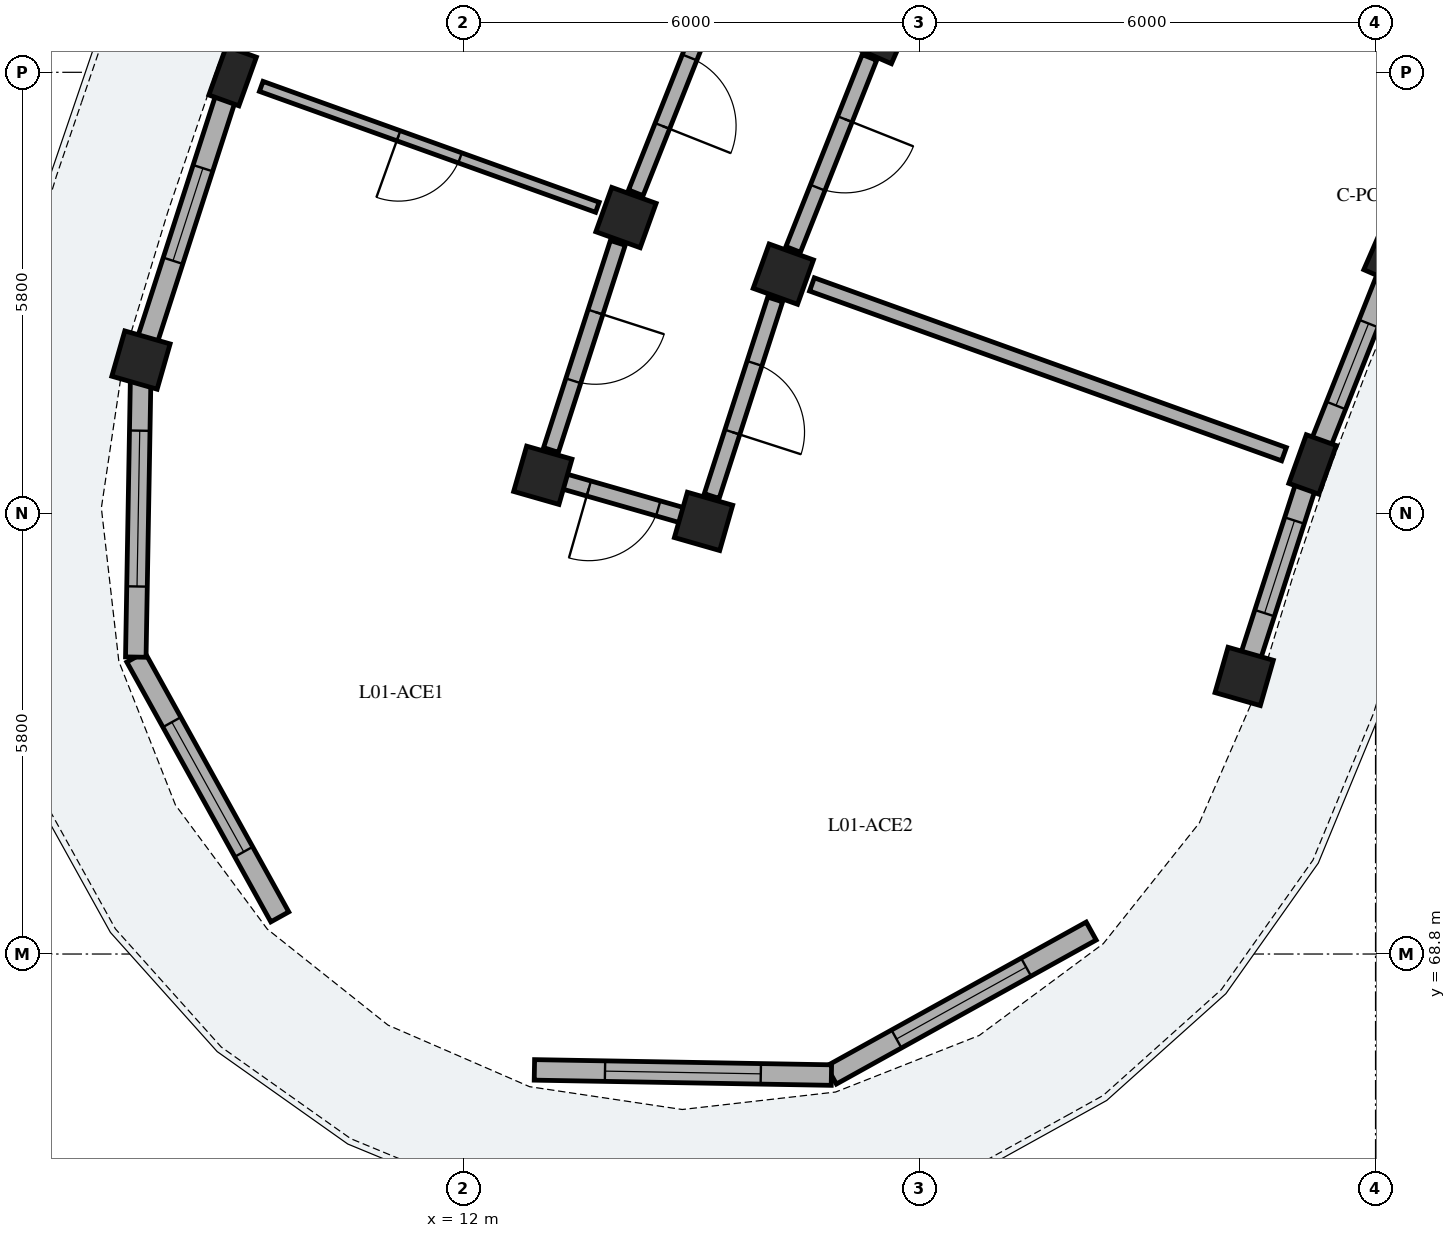
"""IFC4 building model, lengths in metres.
Left out: names, types, materials, properties, quantities, classifications, styles, units other than length and angle.
Written with IfcOpenShell. Run it as: python <this file> out.ifc"""

import sys

from ifc_helpers import new_model, si_unit, direction, frame, frame_2d, origin, origin_2d, place, context, subcontext, project, spatial, rectangle, extrude, element, fill, save


model = new_model("IFC4")
c1 = context("Model", 3, precision=1e-05, world=origin(), true_north=direction((0.0, 1.0)))
c2 = subcontext(c1, "Body", "Model", "MODEL_VIEW")
j1 = project(units=[si_unit("LENGTHUNIT", "METRE"), si_unit("PLANEANGLEUNIT", "RADIAN")], contexts=[c1])
p1 = place(None, origin())
s1 = spatial("IfcSite", under=j1, at=p1, CompositionType="ELEMENT")
p2 = place(p1, origin())
s2 = spatial("IfcBuilding", under=s1, at=p2, CompositionType="ELEMENT")
p3 = place(p2, frame((0.0, 0.0, 4.76)))
s3 = spatial("IfcBuildingStorey", under=s2, at=p3, CompositionType="ELEMENT", Elevation=4.76)
for number, where, z_axis, x_axis in (
    (1, (24.254, 77.964, 0.0), (0.0, 0.0, 1.0), (-0.917, 0.4, 0.0)),
    (2, (17.47, 80.921, 0.0), (0.0, 0.0, 1.0), (-0.917, 0.4, 0.0)),
):
    element("IfcColumn", number, at=place(p3, frame(where, z_axis=z_axis, x_axis=x_axis)), inside=s3, PredefinedType="COLUMN", context=c2, shape_type="SweptSolid", body=[
        extrude(rectangle(XDim=0.62, YDim=0.62, at=origin_2d()), origin(), (0.0, 0.0, 1.0), 3.825),
    ])
p4 = place(p3, frame((23.172, 75.241, 0.0), z_axis=(0.0, 0.0, 1.0), x_axis=(-0.941012100316, 0.338372911236, 0.0)))
e3 = element("IfcColumn", 3, at=p4, inside=s3, PredefinedType="PILASTER", context=c2, shape_type="SweptSolid", body=[
    extrude(rectangle(XDim=0.42, YDim=0.68, at=origin_2d()), origin(), (0.0, 0.0, 1.0), 3.825),
])
for number, where, z_axis, x_axis in (
    (4, (16.208, 77.745, 0.0), (0.0, 0.0, 1.0), (-0.941, 0.338, 0.0)),
    (5, (14.138, 78.489, 0.0), (0.0, 0.0, 1.0), (-0.941, 0.338, 0.0)),
):
    element("IfcColumn", number, at=place(p3, frame(where, z_axis=z_axis, x_axis=x_axis)), inside=s3, PredefinedType="COLUMN", context=c2, shape_type="SweptSolid", body=[
        extrude(rectangle(XDim=0.62, YDim=0.62, at=origin_2d()), origin(), (0.0, 0.0, 1.0), 3.825),
    ])
p5 = place(p3, frame((8.963, 80.35, 0.0), z_axis=(0.0, 0.0, 1.0), x_axis=(-0.941012100316, 0.338372911236, 0.0)))
e6 = element("IfcColumn", 6, at=p5, inside=s3, PredefinedType="PILASTER", context=c2, shape_type="SweptSolid", body=[
    extrude(rectangle(XDim=0.42, YDim=0.68, at=origin_2d()), origin(), (0.0, 0.0, 1.0), 3.825),
])
for number, where, z_axis, x_axis in (
    (7, (22.272, 72.452, 0.0), (0.0, 0.0, 1.0), (-0.961, 0.276, 0.0)),
    (8, (15.159, 74.492, 0.0), (0.0, 0.0, 1.0), (-0.961, 0.276, 0.0)),
    (9, (13.044, 75.098, 0.0), (0.0, 0.0, 1.0), (-0.961, 0.276, 0.0)),
    (10, (7.757, 76.614, 0.0), (0.0, 0.0, 1.0), (-0.961, 0.276, 0.0)),
):
    element("IfcColumn", number, at=place(p3, frame(where, z_axis=z_axis, x_axis=x_axis)), inside=s3, PredefinedType="COLUMN", context=c2, shape_type="SweptSolid", body=[
        extrude(rectangle(XDim=0.62, YDim=0.62, at=origin_2d()), origin(), (0.0, 0.0, 1.0), 3.825),
    ])
p6 = place(p3, frame((24.15, 77.704, 0.0), z_axis=(0.0, 0.0, 1.0), x_axis=(-0.369157243617, -0.929366950932, 0.0)))
e11 = element("IfcWall", 11, at=p6, inside=s3, PredefinedType="SOLIDWALL", context=c2, shape_type="SweptSolid", body=[
    extrude(rectangle(XDim=2.47, YDim=0.27, at=frame_2d((1.235, 0.0))), origin(), (0.0, 0.0, 1.0), 3.075),
])
p7 = place(p6, frame((0.655, 0.0, 0.55)))
e12 = element("IfcOpeningElement", 12, at=p7, cuts=e11, PredefinedType="OPENING", context=c2, shape_type="SweptSolid", body=[
    extrude(rectangle(XDim=1.16, YDim=1.485, at=frame_2d((0.58, 0.743))), frame((0.0, 0.145, 0.0), z_axis=(0.0, -1.0, 0.0), x_axis=(1.0, 0.0, 0.0)), (0.0, 0.0, 1.0), 0.29),
])
p8 = place(p3, frame((8.907, 80.179, 0.0), z_axis=(0.0, 0.0, 1.0), x_axis=(-0.30721065507, -0.951641536195, 0.0)))
e13 = element("IfcWall", 13, at=p8, inside=s3, PredefinedType="SOLIDWALL", context=c2, shape_type="SweptSolid", body=[
    extrude(rectangle(XDim=3.466, YDim=0.27, at=frame_2d((1.733, 0.0))), origin(), (0.0, 0.0, 1.0), 3.075),
])
p9 = place(p8, frame((1.093, 0.0, 0.55)))
e14 = element("IfcOpeningElement", 14, at=p9, cuts=e13, PredefinedType="OPENING", context=c2, shape_type="SweptSolid", body=[
    extrude(rectangle(XDim=1.28, YDim=1.52, at=frame_2d((0.64, 0.76))), frame((0.0, 0.145, 0.0), z_axis=(0.0, -1.0, 0.0), x_axis=(1.0, 0.0, 0.0)), (0.0, 0.0, 1.0), 0.29),
])
p10 = place(p3, frame((23.117, 75.069, 0.0), z_axis=(0.0, 0.0, 1.0), x_axis=(-0.307170258834, -0.951654576035, 0.0)))
e15 = element("IfcWall", 15, at=p10, inside=s3, PredefinedType="SOLIDWALL", context=c2, shape_type="SweptSolid", body=[
    extrude(rectangle(XDim=2.47, YDim=0.27, at=frame_2d((1.235, 0.0))), origin(), (0.0, 0.0, 1.0), 3.075),
])
p11 = place(p10, frame((0.595, 0.0, 0.55)))
e16 = element("IfcOpeningElement", 16, at=p11, cuts=e15, PredefinedType="OPENING", context=c2, shape_type="SweptSolid", body=[
    extrude(rectangle(XDim=1.28, YDim=1.56, at=frame_2d((0.64, 0.78))), frame((0.0, 0.145, 0.0), z_axis=(0.0, -1.0, 0.0), x_axis=(1.0, 0.0, 0.0)), (0.0, 0.0, 1.0), 0.29),
])
p12 = place(p3, frame((20.259, 69.102, 0.0), z_axis=(0.0, 0.0, 1.0), x_axis=(-0.874643043537, -0.484767517881, 0.0)))
e17 = element("IfcWall", 17, at=p12, inside=s3, PredefinedType="SOLIDWALL", context=c2, shape_type="SweptSolid", body=[
    extrude(rectangle(XDim=3.908, YDim=0.27, at=frame_2d((1.954, 0.0))), origin(), (0.0, 0.0, 1.0), 3.075),
])
p13 = place(p12, frame((0.979, 0.0, 0.4)))
e18 = element("IfcOpeningElement", 18, at=p13, cuts=e17, PredefinedType="OPENING", context=c2, shape_type="SweptSolid", body=[
    extrude(rectangle(XDim=1.95, YDim=1.78, at=frame_2d((0.975, 0.89))), frame((0.0, 0.145, 0.0), z_axis=(0.0, -1.0, 0.0), x_axis=(1.0, 0.0, 0.0)), (0.0, 0.0, 1.0), 0.29),
])
p14 = place(p3, frame((16.841, 67.208, 0.0), z_axis=(0.0, 0.0, 1.0), x_axis=(-0.999848096392, 0.017429404492, 0.0)))
e19 = element("IfcWall", 19, at=p14, inside=s3, PredefinedType="SOLIDWALL", context=c2, shape_type="SweptSolid", body=[
    extrude(rectangle(XDim=3.908, YDim=0.27, at=frame_2d((1.954, 0.0))), origin(), (0.0, 0.0, 1.0), 3.075),
])
p15 = place(p14, frame((0.929, 0.0, 0.4)))
e20 = element("IfcOpeningElement", 20, at=p15, cuts=e19, PredefinedType="OPENING", context=c2, shape_type="SweptSolid", body=[
    extrude(rectangle(XDim=2.05, YDim=1.82, at=frame_2d((1.025, 0.91))), frame((0.0, 0.145, 0.0), z_axis=(0.0, -1.0, 0.0), x_axis=(1.0, 0.0, 0.0)), (0.0, 0.0, 1.0), 0.29),
])
p16 = place(p3, frame((9.583, 69.289, 0.0), z_axis=(0.0, 0.0, 1.0), x_axis=(-0.484841794757, 0.874601871743, 0.0)))
e21 = element("IfcWall", 21, at=p16, inside=s3, PredefinedType="SOLIDWALL", context=c2, shape_type="SweptSolid", body=[
    extrude(rectangle(XDim=3.908, YDim=0.27, at=frame_2d((1.954, 0.0))), origin(), (0.0, 0.0, 1.0), 3.075),
])
p17 = place(p16, frame((0.979, 0.0, 0.4)))
e22 = element("IfcOpeningElement", 22, at=p17, cuts=e21, PredefinedType="OPENING", context=c2, shape_type="SweptSolid", body=[
    extrude(rectangle(XDim=1.95, YDim=1.78, at=frame_2d((0.975, 0.89))), frame((0.0, 0.145, 0.0), z_axis=(0.0, -1.0, 0.0), x_axis=(1.0, 0.0, 0.0)), (0.0, 0.0, 1.0), 0.29),
])
p18 = place(p3, frame((7.689, 72.707, 0.0), z_axis=(0.0, 0.0, 1.0), x_axis=(0.017428315893, 0.999848115368, 0.0)))
e23 = element("IfcWall", 23, at=p18, inside=s3, PredefinedType="SOLIDWALL", context=c2, shape_type="SweptSolid", body=[
    extrude(rectangle(XDim=3.908, YDim=0.27, at=frame_2d((1.954, 0.0))), origin(), (0.0, 0.0, 1.0), 3.075),
])
p19 = place(p18, frame((0.929, 0.0, 0.4)))
e24 = element("IfcOpeningElement", 24, at=p19, cuts=e23, PredefinedType="OPENING", context=c2, shape_type="SweptSolid", body=[
    extrude(rectangle(XDim=2.05, YDim=1.82, at=frame_2d((1.025, 0.91))), frame((0.0, 0.145, 0.0), z_axis=(0.0, -1.0, 0.0), x_axis=(1.0, 0.0, 0.0)), (0.0, 0.0, 1.0), 0.29),
])
p20 = place(p3, frame((15.325, 81.475, 0.0), z_axis=(0.0, 0.0, 1.0), x_axis=(-0.369213832442, -0.929344471083, 0.0)))
e25 = element("IfcWall", 25, at=p20, inside=s3, PredefinedType="PARTITIONING", context=c2, shape_type="SweptSolid", body=[
    extrude(rectangle(XDim=2.863, YDim=0.205, at=frame_2d((1.432, 0.0))), origin(), (0.0, 0.0, 1.0), 3.09),
])
p21 = place(p20, frame((0.947, 0.0, 0.0)))
e26 = element("IfcOpeningElement", 26, at=p21, cuts=e25, PredefinedType="OPENING", context=c2, shape_type="SweptSolid", body=[
    extrude(rectangle(XDim=0.97, YDim=2.15, at=frame_2d((0.485, 1.075))), frame((0.0, 0.113, 0.0), z_axis=(0.0, -1.0, 0.0), x_axis=(1.0, 0.0, 0.0)), (0.0, 0.0, 1.0), 0.225),
])
p22 = place(p3, frame((17.341, 80.596, 0.0), z_axis=(0.0, 0.0, 1.0), x_axis=(-0.369237170461, -0.929335198919, 0.0)))
e27 = element("IfcWall", 27, at=p22, inside=s3, PredefinedType="PARTITIONING", context=c2, shape_type="SweptSolid", body=[
    extrude(rectangle(XDim=2.718, YDim=0.205, at=frame_2d((1.359, 0.0))), origin(), (0.0, 0.0, 1.0), 3.09),
])
p23 = place(p22, frame((0.874, 0.0, 0.0)))
e28 = element("IfcOpeningElement", 28, at=p23, cuts=e27, PredefinedType="OPENING", context=c2, shape_type="SweptSolid", body=[
    extrude(rectangle(XDim=0.97, YDim=2.15, at=frame_2d((0.485, 1.075))), frame((0.0, 0.113, 0.0), z_axis=(0.0, -1.0, 0.0), x_axis=(1.0, 0.0, 0.0)), (0.0, 0.0, 1.0), 0.225),
])
p24 = place(p3, frame((13.762, 78.625, 0.0), z_axis=(0.0, 0.0, 1.0), x_axis=(-0.941015806044, 0.338362605463, 0.0)))
e29 = element("IfcWall", 29, at=p24, inside=s3, PredefinedType="PLUMBINGWALL", context=c2, shape_type="SweptSolid", body=[
    extrude(rectangle(XDim=4.7, YDim=0.14, at=frame_2d((2.35, 0.0))), origin(), (0.0, 0.0, 1.0), 3.09),
])
p25 = place(p24, frame((1.92, 0.0, 0.0)))
e30 = element("IfcOpeningElement", 30, at=p25, cuts=e29, PredefinedType="OPENING", context=c2, shape_type="SweptSolid", body=[
    extrude(rectangle(XDim=0.86, YDim=2.06, at=frame_2d((0.43, 1.03))), frame((0.0, 0.08, 0.0), z_axis=(0.0, -1.0, 0.0), x_axis=(1.0, 0.0, 0.0)), (0.0, 0.0, 1.0), 0.16),
])
p26 = place(p3, frame((22.796, 75.376, 0.0), z_axis=(0.0, 0.0, 1.0), x_axis=(-0.941005714099, 0.338390670725, 0.0)))
e31 = element("IfcWall", 31, at=p26, inside=s3, PredefinedType="PARTITIONING", context=c2, shape_type="SweptSolid", body=[
    extrude(rectangle(XDim=6.6, YDim=0.185, at=frame_2d((3.3, 0.0))), origin(), (0.0, 0.0, 1.0), 3.09),
])
p27 = place(p3, frame((14.031, 78.156, 0.0), z_axis=(0.0, 0.0, 1.0), x_axis=(-0.307132325305, -0.951666819193, 0.0)))
e32 = element("IfcWall", 32, at=p27, inside=s3, PredefinedType="PARTITIONING", context=c2, shape_type="SweptSolid", body=[
    extrude(rectangle(XDim=2.863, YDim=0.205, at=frame_2d((1.432, 0.0))), origin(), (0.0, 0.0, 1.0), 3.09),
])
p28 = place(p27, frame((0.957, 0.0, 0.0)))
e33 = element("IfcOpeningElement", 33, at=p28, cuts=e32, PredefinedType="OPENING", context=c2, shape_type="SweptSolid", body=[
    extrude(rectangle(XDim=0.95, YDim=2.13, at=frame_2d((0.475, 1.065))), frame((0.0, 0.113, 0.0), z_axis=(0.0, -1.0, 0.0), x_axis=(1.0, 0.0, 0.0)), (0.0, 0.0, 1.0), 0.225),
])
p29 = place(p3, frame((16.101, 77.412, 0.0), z_axis=(0.0, 0.0, 1.0), x_axis=(-0.307186478934, -0.95164934044, 0.0)))
e34 = element("IfcWall", 34, at=p29, inside=s3, PredefinedType="PARTITIONING", context=c2, shape_type="SweptSolid", body=[
    extrude(rectangle(XDim=2.718, YDim=0.205, at=frame_2d((1.359, 0.0))), origin(), (0.0, 0.0, 1.0), 3.09),
])
p30 = place(p29, frame((0.884, 0.0, 0.0)))
e35 = element("IfcOpeningElement", 35, at=p30, cuts=e34, PredefinedType="OPENING", context=c2, shape_type="SweptSolid", body=[
    extrude(rectangle(XDim=0.95, YDim=2.13, at=frame_2d((0.475, 1.065))), frame((0.0, 0.113, 0.0), z_axis=(0.0, -1.0, 0.0), x_axis=(1.0, 0.0, 0.0)), (0.0, 0.0, 1.0), 0.225),
])
p31 = place(p3, frame((15.111, 74.506, 0.0), z_axis=(0.0, 0.0, 1.0), x_axis=(-0.961264701934, 0.275626872449, 0.0)))
e36 = element("IfcWall", 36, at=p31, inside=s3, PredefinedType="PARTITIONING", context=c2, shape_type="SweptSolid", body=[
    extrude(rectangle(XDim=2.1, YDim=0.205, at=frame_2d((1.05, 0.0))), origin(), (0.0, 0.0, 1.0), 3.09),
])
p32 = place(p31, frame((0.57, 0.0, 0.0)))
e37 = element("IfcOpeningElement", 37, at=p32, cuts=e36, PredefinedType="OPENING", context=c2, shape_type="SweptSolid", body=[
    extrude(rectangle(XDim=0.95, YDim=2.13, at=frame_2d((0.475, 1.065))), frame((0.0, 0.113, 0.0), z_axis=(0.0, -1.0, 0.0), x_axis=(1.0, 0.0, 0.0)), (0.0, 0.0, 1.0), 0.225),
])
p33 = place(p7, origin())
e38 = element("IfcWindow", 38, at=p33, inside=s3, PartitioningType="SINGLE_PANEL", PredefinedType="WINDOW", context=c2, shape_type="SweptSolid", body=[
    extrude(rectangle(XDim=1.16, YDim=1.485, at=frame_2d((0.58, 0.743))), frame((0.0, 0.03, 0.0), z_axis=(0.0, -1.0, 0.0), x_axis=(1.0, 0.0, 0.0)), (0.0, 0.0, 1.0), 0.06),
])
fill(e12, e38)
p34 = place(p9, origin())
e39 = element("IfcWindow", 39, at=p34, inside=s3, PartitioningType="SINGLE_PANEL", PredefinedType="WINDOW", context=c2, shape_type="SweptSolid", body=[
    extrude(rectangle(XDim=1.28, YDim=1.52, at=frame_2d((0.64, 0.76))), frame((0.0, 0.03, 0.0), z_axis=(0.0, -1.0, 0.0), x_axis=(1.0, 0.0, 0.0)), (0.0, 0.0, 1.0), 0.06),
])
fill(e14, e39)
p35 = place(p11, origin())
e40 = element("IfcWindow", 40, at=p35, inside=s3, PartitioningType="SINGLE_PANEL", PredefinedType="WINDOW", context=c2, shape_type="SweptSolid", body=[
    extrude(rectangle(XDim=1.28, YDim=1.56, at=frame_2d((0.64, 0.78))), frame((0.0, 0.03, 0.0), z_axis=(0.0, -1.0, 0.0), x_axis=(1.0, 0.0, 0.0)), (0.0, 0.0, 1.0), 0.06),
])
fill(e16, e40)
p36 = place(p13, origin())
e41 = element("IfcWindow", 41, at=p36, inside=s3, PartitioningType="SINGLE_PANEL", PredefinedType="WINDOW", context=c2, shape_type="SweptSolid", body=[
    extrude(rectangle(XDim=1.95, YDim=1.78, at=frame_2d((0.975, 0.89))), frame((0.0, 0.03, 0.0), z_axis=(0.0, -1.0, 0.0), x_axis=(1.0, 0.0, 0.0)), (0.0, 0.0, 1.0), 0.06),
])
fill(e18, e41)
p37 = place(p15, origin())
e42 = element("IfcWindow", 42, at=p37, inside=s3, PartitioningType="SINGLE_PANEL", PredefinedType="WINDOW", context=c2, shape_type="SweptSolid", body=[
    extrude(rectangle(XDim=2.05, YDim=1.82, at=frame_2d((1.025, 0.91))), frame((0.0, 0.03, 0.0), z_axis=(0.0, -1.0, 0.0), x_axis=(1.0, 0.0, 0.0)), (0.0, 0.0, 1.0), 0.06),
])
fill(e20, e42)
p38 = place(p17, origin())
e43 = element("IfcWindow", 43, at=p38, inside=s3, PartitioningType="SINGLE_PANEL", PredefinedType="WINDOW", context=c2, shape_type="SweptSolid", body=[
    extrude(rectangle(XDim=1.95, YDim=1.78, at=frame_2d((0.975, 0.89))), frame((0.0, 0.03, 0.0), z_axis=(0.0, -1.0, 0.0), x_axis=(1.0, 0.0, 0.0)), (0.0, 0.0, 1.0), 0.06),
])
fill(e22, e43)
p39 = place(p19, origin())
e44 = element("IfcWindow", 44, at=p39, inside=s3, PartitioningType="SINGLE_PANEL", PredefinedType="WINDOW", context=c2, shape_type="SweptSolid", body=[
    extrude(rectangle(XDim=2.05, YDim=1.82, at=frame_2d((1.025, 0.91))), frame((0.0, 0.03, 0.0), z_axis=(0.0, -1.0, 0.0), x_axis=(1.0, 0.0, 0.0)), (0.0, 0.0, 1.0), 0.06),
])
fill(e24, e44)
p40 = place(p21, origin())
e45 = element("IfcDoor", 45, at=p40, inside=s3, OperationType="SINGLE_SWING_RIGHT", PredefinedType="DOOR", context=c2, shape_type="SweptSolid", body=[
    extrude(rectangle(XDim=0.97, YDim=2.15, at=frame_2d((0.485, 1.075))), frame((0.0, 0.025, 0.0), z_axis=(0.0, -1.0, 0.0), x_axis=(1.0, 0.0, 0.0)), (0.0, 0.0, 1.0), 0.05),
])
fill(e26, e45)
p41 = place(p23, origin())
e46 = element("IfcDoor", 46, at=p41, inside=s3, OperationType="SINGLE_SWING_LEFT", PredefinedType="DOOR", context=c2, shape_type="SweptSolid", body=[
    extrude(rectangle(XDim=0.97, YDim=2.15, at=frame_2d((0.485, 1.075))), frame((0.0, 0.025, 0.0), z_axis=(0.0, -1.0, 0.0), x_axis=(1.0, 0.0, 0.0)), (0.0, 0.0, 1.0), 0.05),
])
fill(e28, e46)
p42 = place(p25, origin())
e47 = element("IfcDoor", 47, at=p42, inside=s3, OperationType="SINGLE_SWING_RIGHT", PredefinedType="DOOR", context=c2, shape_type="SweptSolid", body=[
    extrude(rectangle(XDim=0.86, YDim=2.06, at=frame_2d((0.43, 1.03))), frame((0.0, 0.025, 0.0), z_axis=(0.0, -1.0, 0.0), x_axis=(1.0, 0.0, 0.0)), (0.0, 0.0, 1.0), 0.05),
])
fill(e30, e47)
p43 = place(p28, origin())
e48 = element("IfcDoor", 48, at=p43, inside=s3, OperationType="SINGLE_SWING_LEFT", PredefinedType="DOOR", context=c2, shape_type="SweptSolid", body=[
    extrude(rectangle(XDim=0.95, YDim=2.13, at=frame_2d((0.475, 1.065))), frame((0.0, 0.025, 0.0), z_axis=(0.0, -1.0, 0.0), x_axis=(1.0, 0.0, 0.0)), (0.0, 0.0, 1.0), 0.05),
])
fill(e33, e48)
p44 = place(p30, origin())
e49 = element("IfcDoor", 49, at=p44, inside=s3, OperationType="SINGLE_SWING_RIGHT", PredefinedType="DOOR", context=c2, shape_type="SweptSolid", body=[
    extrude(rectangle(XDim=0.95, YDim=2.13, at=frame_2d((0.475, 1.065))), frame((0.0, 0.025, 0.0), z_axis=(0.0, -1.0, 0.0), x_axis=(1.0, 0.0, 0.0)), (0.0, 0.0, 1.0), 0.05),
])
fill(e35, e49)
p45 = place(p32, origin())
e50 = element("IfcDoor", 50, at=p45, inside=s3, OperationType="SINGLE_SWING_RIGHT", PredefinedType="DOOR", context=c2, shape_type="SweptSolid", body=[
    extrude(rectangle(XDim=0.95, YDim=2.13, at=frame_2d((0.475, 1.065))), frame((0.0, 0.025, 0.0), z_axis=(0.0, -1.0, 0.0), x_axis=(1.0, 0.0, 0.0)), (0.0, 0.0, 1.0), 0.05),
])
fill(e37, e50)
save(model, sys.argv[1])
